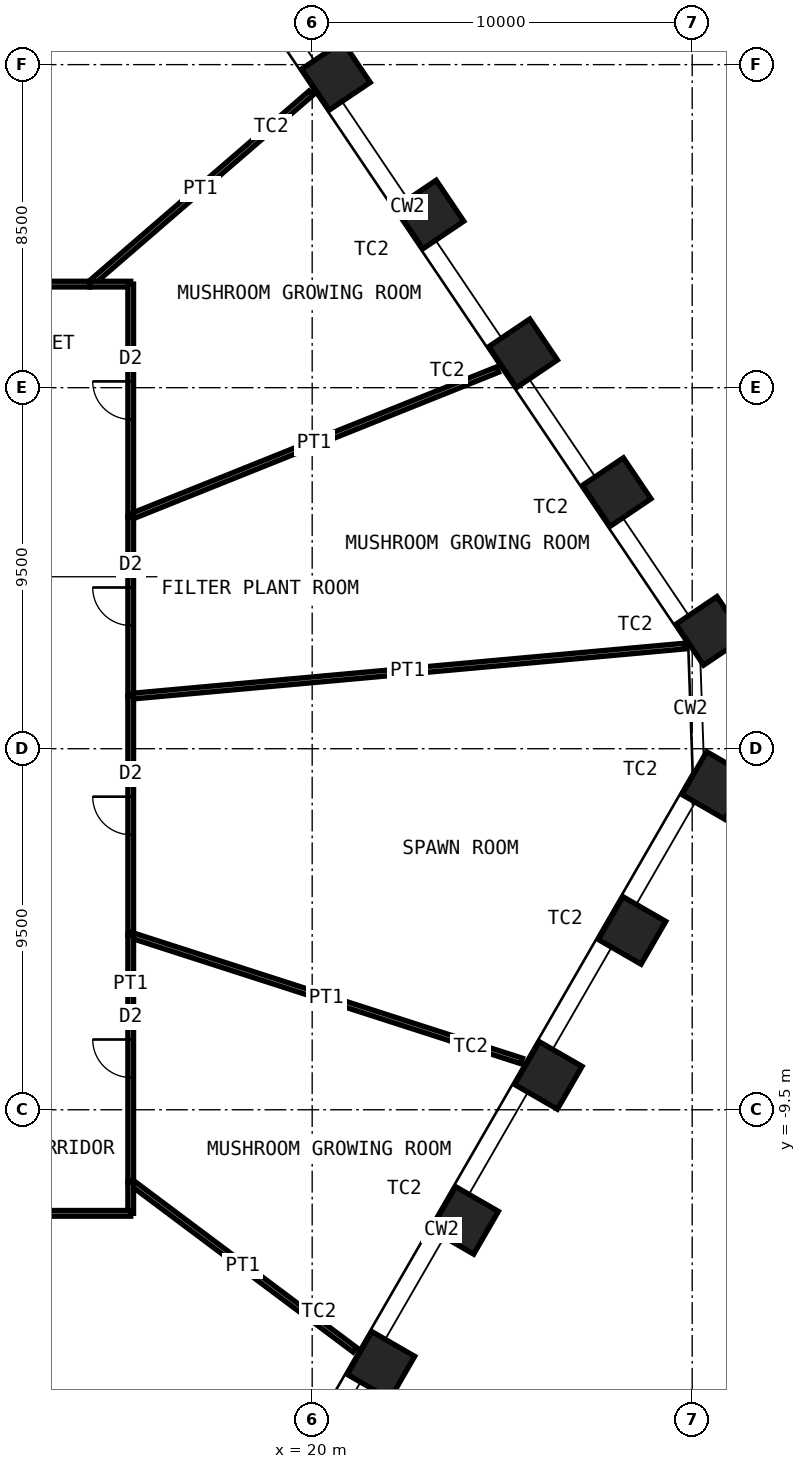
"""IFC4 building model, lengths in metres.
Left out: names, types, materials, properties, quantities, classifications, styles, units other than length and angle.
Written with IfcOpenShell. Run it as: python <this file> out.ifc"""

import sys

from ifc_helpers import new_model, si_unit, direction, frame, frame_2d, origin, origin_2d, place, context, subcontext, project, spatial, rectangle, hollow_rectangle, extrude, element, fill, save


model = new_model("IFC4")
c1 = context("Model", 3, precision=1e-05, world=origin(), true_north=direction((0.0, 1.0)))
c2 = subcontext(c1, "Body", "Model", "MODEL_VIEW")
j1 = project(units=[si_unit("LENGTHUNIT", "METRE"), si_unit("PLANEANGLEUNIT", "RADIAN")], contexts=[c1])
p1 = place(None, origin())
s1 = spatial("IfcSite", under=j1, at=p1, CompositionType="ELEMENT")
p2 = place(p1, origin())
s2 = spatial("IfcBuilding", under=s1, at=p2, CompositionType="ELEMENT")
p3 = place(p2, frame((0.0, 0.0, 62.0)))
s3 = spatial("IfcBuildingStorey", under=s2, at=p3, CompositionType="ELEMENT", Elevation=62.0)
for number, where, z_axis, x_axis in (
    (1, (20.624, 17.707, 0.0), (0.0, 0.0, 1.0), (-0.559, 0.829, 0.0)),
    (2, (23.087, 14.056, 0.0), (0.0, 0.0, 1.0), (-0.559, 0.829, 0.0)),
    (3, (25.55, 10.404, 0.0), (0.0, 0.0, 1.0), (-0.559, 0.829, 0.0)),
    (4, (28.013, 6.752, 0.0), (0.0, 0.0, 1.0), (-0.559, 0.829, 0.0)),
    (5, (30.476, 3.101, 0.0), (0.0, 0.0, 1.0), (-0.559, 0.829, 0.0)),
    (6, (30.618, -0.967, 0.0), (0.0, 0.0, 1.0), (0.5, 0.866, 0.0)),
    (7, (28.416, -4.782, 0.0), (0.0, 0.0, 1.0), (0.5, 0.866, 0.0)),
    (8, (26.214, -8.596, 0.0), (0.0, 0.0, 1.0), (0.5, 0.866, 0.0)),
    (9, (24.011, -12.411, 0.0), (0.0, 0.0, 1.0), (0.5, 0.866, 0.0)),
    (10, (21.809, -16.225, 0.0), (0.0, 0.0, 1.0), (0.5, 0.866, 0.0)),
):
    element("IfcColumn", number, at=place(p3, frame(where, z_axis=z_axis, x_axis=x_axis)), inside=s3, PredefinedType="COLUMN", context=c2, shape_type="SweptSolid", body=[
        extrude(hollow_rectangle(XDim=1.3, YDim=1.3, WallThickness=0.1, at=origin_2d()), origin(), (0.0, 0.0, 1.0), 5.0),
    ])
p4 = place(p3, frame((5.558, 12.225, 0.0), z_axis=(0.0, 0.0, 1.0), x_axis=(1.0, 0.0, 0.0)))
e11 = element("IfcWall", 11, at=p4, inside=s3, PredefinedType="PARTITIONING", context=c2, shape_type="SweptSolid", body=[
    extrude(rectangle(XDim=8.594, YDim=0.15, at=frame_2d((4.297, 0.0))), origin(), (0.0, 0.0, 1.0), 4.8),
])
p5 = place(p4, frame((3.797, 0.0, 0.0)))
e12 = element("IfcOpeningElement", 12, at=p5, cuts=e11, PredefinedType="OPENING", context=c2, shape_type="SweptSolid", body=[
    extrude(rectangle(XDim=1.0, YDim=2.4, at=frame_2d((0.5, 1.2))), frame((0.0, 0.085, 0.0), z_axis=(0.0, -1.0, 0.0), x_axis=(1.0, 0.0, 0.0)), (0.0, 0.0, 1.0), 0.17),
])
p6 = place(p3, frame((19.968, 17.25, 0.0), z_axis=(0.0, 0.0, 1.0), x_axis=(-0.756742305634, -0.653713303264, 0.0)))
e13 = element("IfcWall", 13, at=p6, inside=s3, PredefinedType="PARTITIONING", context=c2, shape_type="SweptSolid", body=[
    extrude(rectangle(XDim=7.687, YDim=0.15, at=frame_2d((3.844, 0.0))), origin(), (0.0, 0.0, 1.0), 3.7),
])
p7 = place(p3, frame((14.151, 12.225, 0.0), z_axis=(0.0, 0.0, 1.0), x_axis=(1.0, 0.0, 0.0)))
e14 = element("IfcWall", 14, at=p7, inside=s3, PredefinedType="PARTITIONING", context=c2, shape_type="SweptSolid", body=[
    extrude(rectangle(XDim=1.074, YDim=0.15, at=frame_2d((0.537, 0.0))), origin(), (0.0, 0.0, 1.0), 4.8),
])
p8 = place(p3, frame((15.225, 12.225, 0.0), z_axis=(0.0, 0.0, 1.0), x_axis=(0.0, -1.0, 0.0)))
e15 = element("IfcWall", 15, at=p8, inside=s3, PredefinedType="PARTITIONING", context=c2, shape_type="SweptSolid", body=[
    extrude(rectangle(XDim=6.12, YDim=0.15, at=frame_2d((3.06, 0.0))), origin(), (0.0, 0.0, 1.0), 4.8),
])
p9 = place(p8, frame((2.56, 0.0, 0.0)))
e16 = element("IfcOpeningElement", 16, at=p9, cuts=e15, PredefinedType="OPENING", context=c2, shape_type="SweptSolid", body=[
    extrude(rectangle(XDim=1.0, YDim=2.4, at=frame_2d((0.5, 1.2))), frame((0.0, 0.085, 0.0), z_axis=(0.0, -1.0, 0.0), x_axis=(1.0, 0.0, 0.0)), (0.0, 0.0, 1.0), 0.17),
])
p10 = place(p3, frame((24.877, 9.975, 0.0), z_axis=(0.0, 0.0, 1.0), x_axis=(-0.928160631083, -0.372179852904, 0.0)))
e17 = element("IfcWall", 17, at=p10, inside=s3, PredefinedType="PARTITIONING", context=c2, shape_type="SweptSolid", body=[
    extrude(rectangle(XDim=10.399, YDim=0.15, at=frame_2d((5.2, 0.0))), origin(), (0.0, 0.0, 1.0), 3.7),
])
p11 = place(p3, frame((15.225, 6.105, 0.0), z_axis=(0.0, 0.0, 1.0), x_axis=(0.0, -1.0, 0.0)))
e18 = element("IfcWall", 18, at=p11, inside=s3, PredefinedType="PARTITIONING", context=c2, shape_type="SweptSolid", body=[
    extrude(rectangle(XDim=4.725, YDim=0.15, at=frame_2d((2.363, 0.0))), origin(), (0.0, 0.0, 1.0), 4.8),
])
p12 = place(p11, frame((1.863, 0.0, 0.0)))
e19 = element("IfcOpeningElement", 19, at=p12, cuts=e18, PredefinedType="OPENING", context=c2, shape_type="SweptSolid", body=[
    extrude(rectangle(XDim=1.0, YDim=2.4, at=frame_2d((0.5, 1.2))), frame((0.0, 0.085, 0.0), z_axis=(0.0, -1.0, 0.0), x_axis=(1.0, 0.0, 0.0)), (0.0, 0.0, 1.0), 0.17),
])
p13 = place(p3, frame((29.796, 2.7, 0.0), z_axis=(0.0, 0.0, 1.0), x_axis=(-0.995918470907, -0.090257405823, 0.0)))
e20 = element("IfcWall", 20, at=p13, inside=s3, PredefinedType="PARTITIONING", context=c2, shape_type="SweptSolid", body=[
    extrude(rectangle(XDim=14.631, YDim=0.15, at=frame_2d((7.315, 0.0))), origin(), (0.0, 0.0, 1.0), 3.7),
])
p14 = place(p3, frame((15.225, 1.38, 0.0), z_axis=(0.0, 0.0, 1.0), x_axis=(0.0, -1.0, 0.0)))
e21 = element("IfcWall", 21, at=p14, inside=s3, PredefinedType="PARTITIONING", context=c2, shape_type="SweptSolid", body=[
    extrude(rectangle(XDim=6.283, YDim=0.15, at=frame_2d((3.141, 0.0))), origin(), (0.0, 0.0, 1.0), 4.8),
])
p15 = place(p14, frame((2.641, 0.0, 0.0)))
e22 = element("IfcOpeningElement", 22, at=p15, cuts=e21, PredefinedType="OPENING", context=c2, shape_type="SweptSolid", body=[
    extrude(rectangle(XDim=1.0, YDim=2.4, at=frame_2d((0.5, 1.2))), frame((0.0, 0.085, 0.0), z_axis=(0.0, -1.0, 0.0), x_axis=(1.0, 0.0, 0.0)), (0.0, 0.0, 1.0), 0.17),
])
p16 = place(p3, frame((25.512, -8.216, 0.0), z_axis=(0.0, 0.0, 1.0), x_axis=(-0.95186413264, 0.306520265225, 0.0)))
e23 = element("IfcWall", 23, at=p16, inside=s3, PredefinedType="PARTITIONING", context=c2, shape_type="SweptSolid", body=[
    extrude(rectangle(XDim=10.808, YDim=0.15, at=frame_2d((5.404, 0.0))), origin(), (0.0, 0.0, 1.0), 3.7),
])
p17 = place(p3, frame((15.225, -4.903, 0.0), z_axis=(0.0, 0.0, 1.0), x_axis=(0.0, -1.0, 0.0)))
e24 = element("IfcWall", 24, at=p17, inside=s3, PredefinedType="PARTITIONING", context=c2, shape_type="SweptSolid", body=[
    extrude(rectangle(XDim=6.497, YDim=0.15, at=frame_2d((3.248, 0.0))), origin(), (0.0, 0.0, 1.0), 4.8),
])
p18 = place(p17, frame((2.748, 0.0, 0.0)))
e25 = element("IfcOpeningElement", 25, at=p18, cuts=e24, PredefinedType="OPENING", context=c2, shape_type="SweptSolid", body=[
    extrude(rectangle(XDim=1.0, YDim=2.4, at=frame_2d((0.5, 1.2))), frame((0.0, 0.085, 0.0), z_axis=(0.0, -1.0, 0.0), x_axis=(1.0, 0.0, 0.0)), (0.0, 0.0, 1.0), 0.17),
])
p19 = place(p3, frame((21.123, -15.815, 0.0), z_axis=(0.0, 0.0, 1.0), x_axis=(-0.800484840692, 0.599353001012, 0.0)))
e26 = element("IfcWall", 26, at=p19, inside=s3, PredefinedType="PARTITIONING", context=c2, shape_type="SweptSolid", body=[
    extrude(rectangle(XDim=7.368, YDim=0.15, at=frame_2d((3.684, 0.0))), origin(), (0.0, 0.0, 1.0), 3.7),
])
p20 = place(p3, frame((15.225, -11.399, 0.0), z_axis=(0.0, 0.0, 1.0), x_axis=(0.0, -1.0, 0.0)))
e27 = element("IfcWall", 27, at=p20, inside=s3, PredefinedType="PARTITIONING", context=c2, shape_type="SweptSolid", body=[
    extrude(rectangle(XDim=0.826, YDim=0.15, at=frame_2d((0.413, 0.0))), origin(), (0.0, 0.0, 1.0), 4.8),
])
p21 = place(p3, frame((15.225, -12.225, 0.0), z_axis=(0.0, 0.0, 1.0), x_axis=(-1.0, 0.0, 0.0)))
e28 = element("IfcWall", 28, at=p21, inside=s3, PredefinedType="PARTITIONING", context=c2, shape_type="SweptSolid", body=[
    extrude(rectangle(XDim=6.488, YDim=0.15, at=frame_2d((3.244, 0.0))), origin(), (0.0, 0.0, 1.0), 4.8),
])
p22 = place(p21, frame((2.744, 0.0, 0.0)))
e29 = element("IfcOpeningElement", 29, at=p22, cuts=e28, PredefinedType="OPENING", context=c2, shape_type="SweptSolid", body=[
    extrude(rectangle(XDim=1.0, YDim=2.4, at=frame_2d((0.5, 1.2))), frame((0.0, 0.085, 0.0), z_axis=(0.0, -1.0, 0.0), x_axis=(1.0, 0.0, 0.0)), (0.0, 0.0, 1.0), 0.17),
])
p23 = place(p3, frame((16.74, -23.423, 0.0), z_axis=(0.0, 0.0, 1.0), x_axis=(-0.581459653783, 0.813575239927, 0.0)))
e30 = element("IfcWall", 30, at=p23, inside=s3, PredefinedType="PARTITIONING", context=c2, shape_type="SweptSolid", body=[
    extrude(rectangle(XDim=13.764, YDim=0.15, at=frame_2d((6.882, 0.0))), origin(), (0.0, 0.0, 1.0), 3.7),
])
p24 = place(p9, origin())
e31 = element("IfcDoor", 31, at=p24, inside=s3, OperationType="SINGLE_SWING_LEFT", PredefinedType="DOOR", context=c2, shape_type="SweptSolid", body=[
    extrude(rectangle(XDim=1.0, YDim=2.4, at=frame_2d((0.5, 1.2))), frame((0.0, 0.025, 0.0), z_axis=(0.0, -1.0, 0.0), x_axis=(1.0, 0.0, 0.0)), (0.0, 0.0, 1.0), 0.05),
])
fill(e16, e31)
p25 = place(p12, origin())
e32 = element("IfcDoor", 32, at=p25, inside=s3, OperationType="SINGLE_SWING_LEFT", PredefinedType="DOOR", context=c2, shape_type="SweptSolid", body=[
    extrude(rectangle(XDim=1.0, YDim=2.4, at=frame_2d((0.5, 1.2))), frame((0.0, 0.025, 0.0), z_axis=(0.0, -1.0, 0.0), x_axis=(1.0, 0.0, 0.0)), (0.0, 0.0, 1.0), 0.05),
])
fill(e19, e32)
p26 = place(p15, origin())
e33 = element("IfcDoor", 33, at=p26, inside=s3, OperationType="SINGLE_SWING_LEFT", PredefinedType="DOOR", context=c2, shape_type="SweptSolid", body=[
    extrude(rectangle(XDim=1.0, YDim=2.4, at=frame_2d((0.5, 1.2))), frame((0.0, 0.025, 0.0), z_axis=(0.0, -1.0, 0.0), x_axis=(1.0, 0.0, 0.0)), (0.0, 0.0, 1.0), 0.05),
])
fill(e22, e33)
p27 = place(p18, origin())
e34 = element("IfcDoor", 34, at=p27, inside=s3, OperationType="SINGLE_SWING_LEFT", PredefinedType="DOOR", context=c2, shape_type="SweptSolid", body=[
    extrude(rectangle(XDim=1.0, YDim=2.4, at=frame_2d((0.5, 1.2))), frame((0.0, 0.025, 0.0), z_axis=(0.0, -1.0, 0.0), x_axis=(1.0, 0.0, 0.0)), (0.0, 0.0, 1.0), 0.05),
])
fill(e25, e34)
save(model, sys.argv[1])
